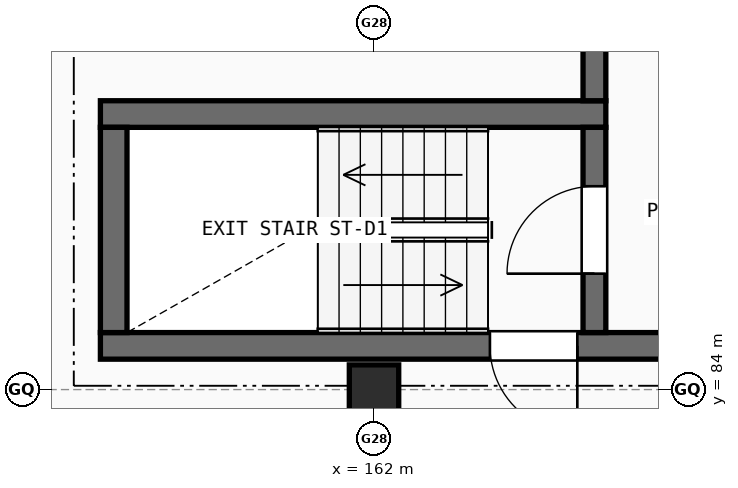
"""IFC4 building model, lengths in metres.
Left out: names, types, materials, properties, quantities, classifications, styles, units other than length and angle.
Written with IfcOpenShell. Run it as: python <this file> out.ifc"""

import sys

from ifc_helpers import new_model, si_unit, direction, frame, frame_2d, origin, origin_2d, place, context, subcontext, project, spatial, rectangle, extrude, element, fill, save


model = new_model("IFC4")
c1 = context("Model", 3, precision=1e-05, world=origin(), true_north=direction((0.0, 1.0)))
c2 = subcontext(c1, "Body", "Model", "MODEL_VIEW")
j1 = project(units=[si_unit("LENGTHUNIT", "METRE"), si_unit("PLANEANGLEUNIT", "RADIAN")], contexts=[c1])
p1 = place(None, origin())
s1 = spatial("IfcSite", under=j1, at=p1, CompositionType="ELEMENT")
p2 = place(p1, origin())
s2 = spatial("IfcBuilding", under=s1, at=p2, CompositionType="ELEMENT")
p3 = place(p2, frame((0.0, 0.0, 14.1)))
s3 = spatial("IfcBuildingStorey", under=s2, at=p3, CompositionType="ELEMENT", Elevation=14.1)
p4 = place(p3, frame((162.0, 84.0, 0.0), z_axis=(0.0, 0.0, 1.0), x_axis=(1.0, 0.0, 0.0)))
e1 = element("IfcColumn", 1, at=p4, inside=s3, PredefinedType="COLUMN", context=c2, shape_type="SweptSolid", body=[
    extrude(rectangle(XDim=0.65, YDim=0.65, at=origin_2d()), origin(), (0.0, 0.0, 1.0), 2.95),
])
p5 = place(p3, frame((158.4, 84.575, 0.0), z_axis=(0.0, 0.0, 1.0), x_axis=(1.0, 0.0, 0.0)))
e2 = element("IfcWall", 2, at=p5, inside=s3, PredefinedType="SHEAR", context=c2, shape_type="SweptSolid", body=[
    extrude(rectangle(XDim=11.4, YDim=0.35, at=frame_2d((5.7, 0.0))), origin(), (0.0, 0.0, 1.0), 2.95),
])
p6 = place(p5, frame((5.125, 0.0, 0.0)))
e3 = element("IfcOpeningElement", 3, at=p6, cuts=e2, PredefinedType="OPENING", context=c2, shape_type="SweptSolid", body=[
    extrude(rectangle(XDim=1.15, YDim=2.15, at=frame_2d((0.575, 1.075))), frame((0.0, 0.185, 0.0), z_axis=(0.0, -1.0, 0.0), x_axis=(1.0, 0.0, 0.0)), (0.0, 0.0, 1.0), 0.37),
])
p7 = place(p3, frame((165.05, 87.625, 0.0), z_axis=(0.0, 0.0, 1.0), x_axis=(-1.0, 0.0, 0.0)))
e4 = element("IfcWall", 4, at=p7, inside=s3, PredefinedType="SHEAR", context=c2, shape_type="SweptSolid", body=[
    extrude(rectangle(XDim=6.65, YDim=0.35, at=frame_2d((3.325, 0.0))), origin(), (0.0, 0.0, 1.0), 2.95),
])
p8 = place(p3, frame((158.575, 87.45, 0.0), z_axis=(0.0, 0.0, 1.0), x_axis=(0.0, -1.0, 0.0)))
e5 = element("IfcWall", 5, at=p8, inside=s3, PredefinedType="SHEAR", context=c2, shape_type="SweptSolid", body=[
    extrude(rectangle(XDim=2.7, YDim=0.35, at=frame_2d((1.35, 0.0))), origin(), (0.0, 0.0, 1.0), 2.95),
])
p9 = place(p3, frame((164.9, 84.75, 0.0), z_axis=(0.0, 0.0, 1.0), x_axis=(0.0, 1.0, 0.0)))
e6 = element("IfcWall", 6, at=p9, inside=s3, PredefinedType="SHEAR", context=c2, shape_type="SweptSolid", body=[
    extrude(rectangle(XDim=2.7, YDim=0.3, at=frame_2d((1.35, 0.0))), origin(), (0.0, 0.0, 1.0), 2.95),
])
p10 = place(p9, frame((0.775, 0.0, 0.0)))
e7 = element("IfcOpeningElement", 7, at=p10, cuts=e6, PredefinedType="OPENING", context=c2, shape_type="SweptSolid", body=[
    extrude(rectangle(XDim=1.15, YDim=2.15, at=frame_2d((0.575, 1.075))), frame((0.0, 0.16, 0.0), z_axis=(0.0, -1.0, 0.0), x_axis=(1.0, 0.0, 0.0)), (0.0, 0.0, 1.0), 0.32),
])
p11 = place(p3, frame((164.9, 87.8, 0.0), z_axis=(0.0, 0.0, 1.0), x_axis=(0.0, 1.0, 0.0)))
e8 = element("IfcWall", 8, at=p11, inside=s3, PredefinedType="SHEAR", context=c2, shape_type="SweptSolid", body=[
    extrude(rectangle(XDim=3.35, YDim=0.3, at=frame_2d((1.675, 0.0))), origin(), (0.0, 0.0, 1.0), 2.95),
])
p12 = place(p6, origin())
e9 = element("IfcDoor", 9, at=p12, inside=s3, OperationType="SINGLE_SWING_RIGHT", PredefinedType="DOOR", context=c2, shape_type="SweptSolid", body=[
    extrude(rectangle(XDim=1.15, YDim=2.15, at=frame_2d((0.575, 1.075))), frame((0.0, 0.025, 0.0), z_axis=(0.0, -1.0, 0.0), x_axis=(1.0, 0.0, 0.0)), (0.0, 0.0, 1.0), 0.05),
])
fill(e3, e9)
p13 = place(p10, origin())
e10 = element("IfcDoor", 10, at=p13, inside=s3, OperationType="SINGLE_SWING_LEFT", PredefinedType="DOOR", context=c2, shape_type="SweptSolid", body=[
    extrude(rectangle(XDim=1.15, YDim=2.15, at=frame_2d((0.575, 1.075))), frame((0.0, 0.025, 0.0), z_axis=(0.0, -1.0, 0.0), x_axis=(1.0, 0.0, 0.0)), (0.0, 0.0, 1.0), 0.05),
])
fill(e7, e10)
save(model, sys.argv[1])
